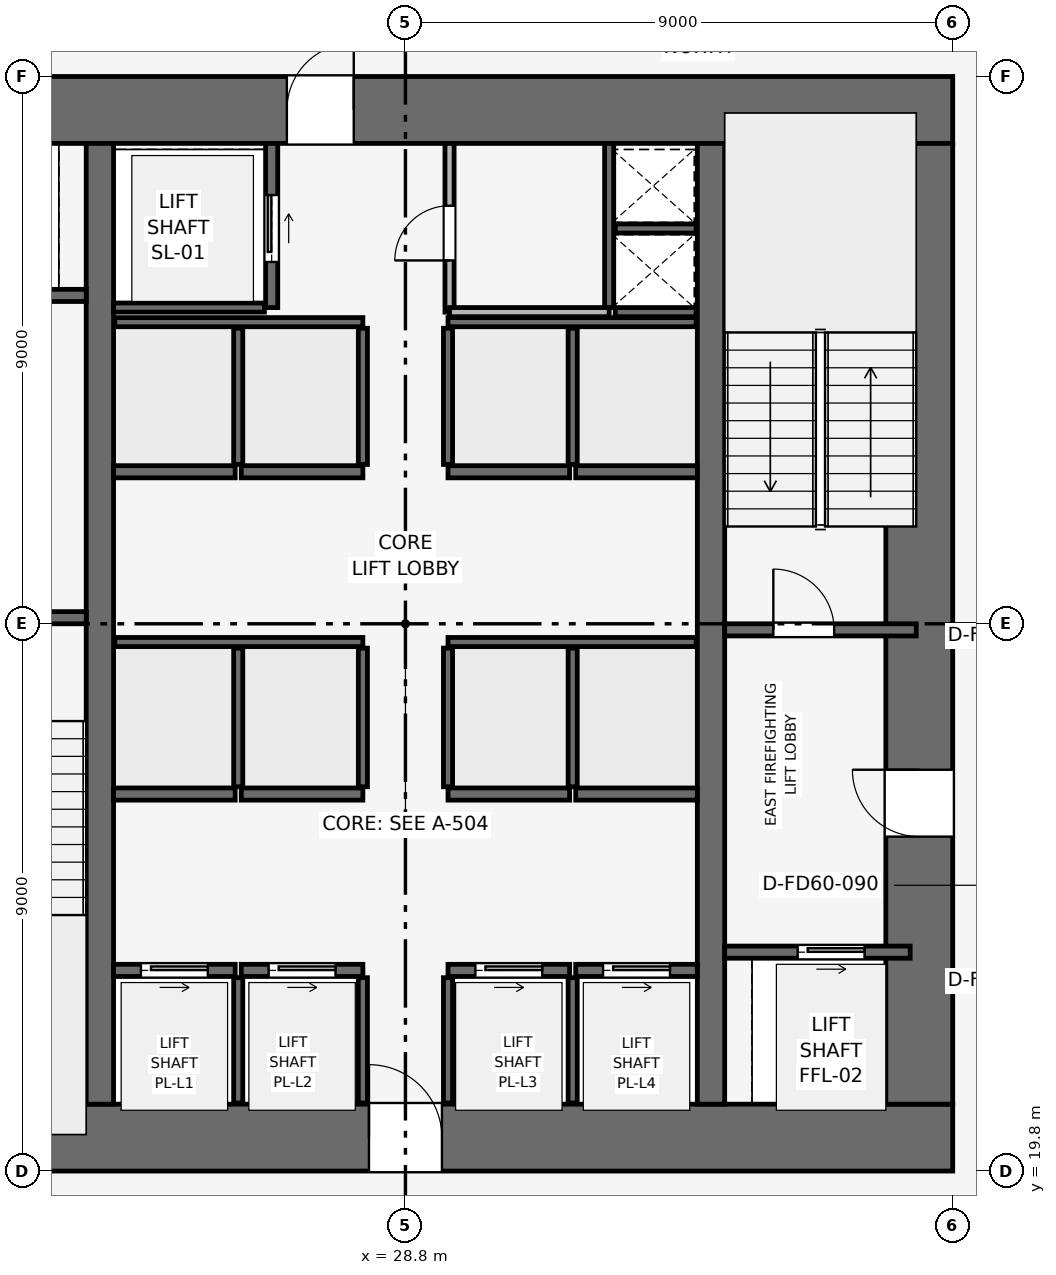
"""IFC4 building model, lengths in metres.
Left out: names, types, materials, properties, quantities, classifications, styles, units other than length and angle.
Written with IfcOpenShell. Run it as: python <this file> out.ifc"""

import sys

from ifc_helpers import new_model, si_unit, direction, frame, frame_2d, origin, place, context, subcontext, project, spatial, rectangle, extrude, element, fill, save


model = new_model("IFC4")
c1 = context("Model", 3, precision=1e-05, world=origin(), true_north=direction((0.0, 1.0)))
c2 = subcontext(c1, "Body", "Model", "MODEL_VIEW")
j1 = project(units=[si_unit("LENGTHUNIT", "METRE"), si_unit("PLANEANGLEUNIT", "RADIAN")], contexts=[c1])
p1 = place(None, origin())
s1 = spatial("IfcSite", under=j1, at=p1, CompositionType="ELEMENT")
p2 = place(p1, origin())
s2 = spatial("IfcBuilding", under=s1, at=p2, CompositionType="ELEMENT")
p3 = place(p2, frame((0.0, 0.0, 61.2)))
s3 = spatial("IfcBuildingStorey", under=s2, at=p3, CompositionType="ELEMENT", Elevation=61.2)
p4 = place(p3, frame((19.8, 20.35, 0.0), z_axis=(0.0, 0.0, 1.0), x_axis=(1.0, 0.0, 0.0)))
e1 = element("IfcWall", 1, at=p4, inside=s3, PredefinedType="SHEAR", context=c2, shape_type="SweptSolid", body=[
    extrude(rectangle(XDim=18.0, YDim=1.1, at=frame_2d((9.0, 0.0))), origin(), (0.0, 0.0, 1.0), 3.9),
])
p5 = place(p4, frame((8.4, 0.0, 0.0)))
e2 = element("IfcOpeningElement", 2, at=p5, cuts=e1, PredefinedType="OPENING", context=c2, shape_type="SweptSolid", body=[
    extrude(rectangle(XDim=1.2, YDim=2.2, at=frame_2d((0.6, 1.1))), frame((0.0, 0.56, 0.0), z_axis=(0.0, -1.0, 0.0), x_axis=(1.0, 0.0, 0.0)), (0.0, 0.0, 1.0), 1.12),
])
p6 = place(p3, frame((19.8, 37.25, 0.0), z_axis=(0.0, 0.0, 1.0), x_axis=(1.0, 0.0, 0.0)))
e3 = element("IfcWall", 3, at=p6, inside=s3, PredefinedType="SHEAR", context=c2, shape_type="SweptSolid", body=[
    extrude(rectangle(XDim=18.0, YDim=1.1, at=frame_2d((9.0, 0.0))), origin(), (0.0, 0.0, 1.0), 3.9),
])
p7 = place(p6, frame((7.05, 0.0, 0.0)))
e4 = element("IfcOpeningElement", 4, at=p7, cuts=e3, PredefinedType="OPENING", context=c2, shape_type="SweptSolid", body=[
    extrude(rectangle(XDim=1.1, YDim=2.15, at=frame_2d((0.55, 1.075))), frame((0.0, 0.56, 0.0), z_axis=(0.0, -1.0, 0.0), x_axis=(1.0, 0.0, 0.0)), (0.0, 0.0, 1.0), 1.12),
])
p8 = place(p3, frame((37.25, 20.9, 0.0), z_axis=(0.0, 0.0, 1.0), x_axis=(0.0, 1.0, 0.0)))
e5 = element("IfcWall", 5, at=p8, inside=s3, PredefinedType="SHEAR", context=c2, shape_type="SweptSolid", body=[
    extrude(rectangle(XDim=15.8, YDim=1.1, at=frame_2d((7.9, 0.0))), origin(), (0.0, 0.0, 1.0), 3.9),
])
p9 = place(p8, frame((4.4, 0.0, 0.0)))
e6 = element("IfcOpeningElement", 6, at=p9, cuts=e5, PredefinedType="OPENING", context=c2, shape_type="SweptSolid", body=[
    extrude(rectangle(XDim=1.1, YDim=2.15, at=frame_2d((0.55, 1.075))), frame((0.0, 0.56, 0.0), z_axis=(0.0, -1.0, 0.0), x_axis=(1.0, 0.0, 0.0)), (0.0, 0.0, 1.0), 1.12),
])
for number, where, z_axis, x_axis in (
    (7, (23.775, 20.9, 0.0), (0.0, 0.0, 1.0), (0.0, 1.0, 0.0)),
    (8, (33.825, 20.9, 0.0), (0.0, 0.0, 1.0), (0.0, 1.0, 0.0)),
):
    element("IfcWall", number, at=place(p3, frame(where, z_axis=z_axis, x_axis=x_axis)), inside=s3, PredefinedType="SHEAR", context=c2, shape_type="SweptSolid", body=[
        extrude(rectangle(XDim=15.8, YDim=0.45, at=frame_2d((7.9, 0.0))), origin(), (0.0, 0.0, 1.0), 3.9),
    ])
p10 = place(p3, frame((20.4, 28.9, 0.0), z_axis=(0.0, 0.0, 1.0), x_axis=(1.0, 0.0, 0.0)))
e9 = element("IfcWall", 9, at=p10, inside=s3, PredefinedType="SHEAR", context=c2, shape_type="SweptSolid", body=[
    extrude(rectangle(XDim=3.15, YDim=0.2, at=frame_2d((1.575, 0.0))), origin(), (0.0, 0.0, 1.0), 3.65),
])
p11 = place(p10, frame((0.8, 0.0, 0.0)))
e10 = element("IfcOpeningElement", 10, at=p11, cuts=e9, PredefinedType="OPENING", context=c2, shape_type="SweptSolid", body=[
    extrude(rectangle(XDim=1.0, YDim=2.1, at=frame_2d((0.5, 1.05))), frame((0.0, 0.11, 0.0), z_axis=(0.0, -1.0, 0.0), x_axis=(1.0, 0.0, 0.0)), (0.0, 0.0, 1.0), 0.22),
])
p12 = place(p3, frame((34.05, 28.7, 0.0), z_axis=(0.0, 0.0, 1.0), x_axis=(1.0, 0.0, 0.0)))
e11 = element("IfcWall", 11, at=p12, inside=s3, PredefinedType="SHEAR", context=c2, shape_type="SweptSolid", body=[
    extrude(rectangle(XDim=3.15, YDim=0.2, at=frame_2d((1.575, 0.0))), origin(), (0.0, 0.0, 1.0), 3.65),
])
p13 = place(p12, frame((0.8, 0.0, 0.0)))
e12 = element("IfcOpeningElement", 12, at=p13, cuts=e11, PredefinedType="OPENING", context=c2, shape_type="SweptSolid", body=[
    extrude(rectangle(XDim=1.0, YDim=2.1, at=frame_2d((0.5, 1.05))), frame((0.0, 0.11, 0.0), z_axis=(0.0, -1.0, 0.0), x_axis=(1.0, 0.0, 0.0)), (0.0, 0.0, 1.0), 0.22),
])
p14 = place(p3, frame((32.15, 34.0, 0.0), z_axis=(0.0, 0.0, 1.0), x_axis=(0.0, 1.0, 0.0)))
e13 = element("IfcWall", 13, at=p14, inside=s3, PredefinedType="SHEAR", context=c2, shape_type="SweptSolid", body=[
    extrude(rectangle(XDim=2.7, YDim=0.15, at=frame_2d((1.35, 0.0))), origin(), (0.0, 0.0, 1.0), 3.65),
])
for number, where, z_axis, x_axis in (
    (14, (32.25, 33.925, 0.0), (0.0, 0.0, 1.0), (1.0, 0.0, 0.0)),
    (15, (32.25, 35.3, 0.0), (0.0, 0.0, 1.0), (1.0, 0.0, 0.0)),
):
    element("IfcWall", number, at=place(p3, frame(where, z_axis=z_axis, x_axis=x_axis)), inside=s3, PredefinedType="SHEAR", context=c2, shape_type="SweptSolid", body=[
        extrude(rectangle(XDim=1.33, YDim=0.15, at=frame_2d((0.665, 0.0))), origin(), (0.0, 0.0, 1.0), 3.65),
    ])
p15 = place(p3, frame((20.5, 34.2, 0.0), z_axis=(0.0, 0.0, 1.0), x_axis=(1.0, 0.0, 0.0)))
e16 = element("IfcWall", 16, at=p15, inside=s3, PredefinedType="SHEAR", context=c2, shape_type="SweptSolid", body=[
    extrude(rectangle(XDim=3.05, YDim=0.2, at=frame_2d((1.525, 0.0))), origin(), (0.0, 0.0, 1.0), 3.65),
])
p16 = place(p15, frame((0.75, 0.0, 0.0)))
e17 = element("IfcOpeningElement", 17, at=p16, cuts=e16, PredefinedType="OPENING", context=c2, shape_type="SweptSolid", body=[
    extrude(rectangle(XDim=1.1, YDim=2.15, at=frame_2d((0.55, 1.075))), frame((0.0, 0.11, 0.0), z_axis=(0.0, -1.0, 0.0), x_axis=(1.0, 0.0, 0.0)), (0.0, 0.0, 1.0), 0.22),
])
p17 = place(p3, frame((34.05, 23.4, 0.0), z_axis=(0.0, 0.0, 1.0), x_axis=(1.0, 0.0, 0.0)))
e18 = element("IfcWall", 18, at=p17, inside=s3, PredefinedType="SHEAR", context=c2, shape_type="SweptSolid", body=[
    extrude(rectangle(XDim=3.05, YDim=0.2, at=frame_2d((1.525, 0.0))), origin(), (0.0, 0.0, 1.0), 3.65),
])
p18 = place(p17, frame((1.2, 0.0, 0.0)))
e19 = element("IfcOpeningElement", 19, at=p18, cuts=e18, PredefinedType="OPENING", context=c2, shape_type="SweptSolid", body=[
    extrude(rectangle(XDim=1.1, YDim=2.15, at=frame_2d((0.55, 1.075))), frame((0.0, 0.11, 0.0), z_axis=(0.0, -1.0, 0.0), x_axis=(1.0, 0.0, 0.0)), (0.0, 0.0, 1.0), 0.22),
])
p19 = place(p3, frame((26.6, 34.0, 0.0), z_axis=(0.0, 0.0, 1.0), x_axis=(0.0, 1.0, 0.0)))
e20 = element("IfcWall", 20, at=p19, inside=s3, PredefinedType="SHEAR", context=c2, shape_type="SweptSolid", body=[
    extrude(rectangle(XDim=2.7, YDim=0.2, at=frame_2d((1.35, 0.0))), origin(), (0.0, 0.0, 1.0), 3.65),
])
p20 = place(p19, frame((0.75, 0.0, 0.0)))
e21 = element("IfcOpeningElement", 21, at=p20, cuts=e20, PredefinedType="OPENING", context=c2, shape_type="SweptSolid", body=[
    extrude(rectangle(XDim=1.1, YDim=2.15, at=frame_2d((0.55, 1.075))), frame((0.0, 0.11, 0.0), z_axis=(0.0, -1.0, 0.0), x_axis=(1.0, 0.0, 0.0)), (0.0, 0.0, 1.0), 0.22),
])
p21 = place(p3, frame((24.0, 34.0, 0.0), z_axis=(0.0, 0.0, 1.0), x_axis=(1.0, 0.0, 0.0)))
e22 = element("IfcWall", 22, at=p21, inside=s3, PredefinedType="SHEAR", context=c2, shape_type="SweptSolid", body=[
    extrude(rectangle(XDim=2.48, YDim=0.15, at=frame_2d((1.24, 0.0))), origin(), (0.0, 0.0, 1.0), 3.65),
])
p22 = place(p3, frame((24.0, 23.1, 0.0), z_axis=(0.0, 0.0, 1.0), x_axis=(1.0, 0.0, 0.0)))
e23 = element("IfcWall", 23, at=p22, inside=s3, PredefinedType="SHEAR", context=c2, shape_type="SweptSolid", body=[
    extrude(rectangle(XDim=2.0, YDim=0.2, at=frame_2d((1.0, 0.0))), origin(), (0.0, 0.0, 1.0), 3.65),
])
p23 = place(p22, frame((0.45, 0.0, 0.0)))
e24 = element("IfcOpeningElement", 24, at=p23, cuts=e23, PredefinedType="OPENING", context=c2, shape_type="SweptSolid", body=[
    extrude(rectangle(XDim=1.1, YDim=2.15, at=frame_2d((0.55, 1.075))), frame((0.0, 0.11, 0.0), z_axis=(0.0, -1.0, 0.0), x_axis=(1.0, 0.0, 0.0)), (0.0, 0.0, 1.0), 0.22),
])
p24 = place(p3, frame((26.1, 23.1, 0.0), z_axis=(0.0, 0.0, 1.0), x_axis=(1.0, 0.0, 0.0)))
e25 = element("IfcWall", 25, at=p24, inside=s3, PredefinedType="SHEAR", context=c2, shape_type="SweptSolid", body=[
    extrude(rectangle(XDim=2.0, YDim=0.2, at=frame_2d((1.0, 0.0))), origin(), (0.0, 0.0, 1.0), 3.65),
])
p25 = place(p24, frame((0.45, 0.0, 0.0)))
e26 = element("IfcOpeningElement", 26, at=p25, cuts=e25, PredefinedType="OPENING", context=c2, shape_type="SweptSolid", body=[
    extrude(rectangle(XDim=1.1, YDim=2.15, at=frame_2d((0.55, 1.075))), frame((0.0, 0.11, 0.0), z_axis=(0.0, -1.0, 0.0), x_axis=(1.0, 0.0, 0.0)), (0.0, 0.0, 1.0), 0.22),
])
p26 = place(p3, frame((29.5, 23.1, 0.0), z_axis=(0.0, 0.0, 1.0), x_axis=(1.0, 0.0, 0.0)))
e27 = element("IfcWall", 27, at=p26, inside=s3, PredefinedType="SHEAR", context=c2, shape_type="SweptSolid", body=[
    extrude(rectangle(XDim=2.0, YDim=0.2, at=frame_2d((1.0, 0.0))), origin(), (0.0, 0.0, 1.0), 3.65),
])
p27 = place(p26, frame((0.45, 0.0, 0.0)))
e28 = element("IfcOpeningElement", 28, at=p27, cuts=e27, PredefinedType="OPENING", context=c2, shape_type="SweptSolid", body=[
    extrude(rectangle(XDim=1.1, YDim=2.15, at=frame_2d((0.55, 1.075))), frame((0.0, 0.11, 0.0), z_axis=(0.0, -1.0, 0.0), x_axis=(1.0, 0.0, 0.0)), (0.0, 0.0, 1.0), 0.22),
])
p28 = place(p3, frame((31.6, 23.1, 0.0), z_axis=(0.0, 0.0, 1.0), x_axis=(1.0, 0.0, 0.0)))
e29 = element("IfcWall", 29, at=p28, inside=s3, PredefinedType="SHEAR", context=c2, shape_type="SweptSolid", body=[
    extrude(rectangle(XDim=2.0, YDim=0.2, at=frame_2d((1.0, 0.0))), origin(), (0.0, 0.0, 1.0), 3.65),
])
p29 = place(p28, frame((0.45, 0.0, 0.0)))
e30 = element("IfcOpeningElement", 30, at=p29, cuts=e29, PredefinedType="OPENING", context=c2, shape_type="SweptSolid", body=[
    extrude(rectangle(XDim=1.1, YDim=2.15, at=frame_2d((0.55, 1.075))), frame((0.0, 0.11, 0.0), z_axis=(0.0, -1.0, 0.0), x_axis=(1.0, 0.0, 0.0)), (0.0, 0.0, 1.0), 0.22),
])
for number, where, z_axis, x_axis in (
    (31, (24.0, 26.0, 0.0), (0.0, 0.0, 1.0), (1.0, 0.0, 0.0)),
    (32, (26.1, 26.0, 0.0), (0.0, 0.0, 1.0), (1.0, 0.0, 0.0)),
    (33, (29.5, 26.0, 0.0), (0.0, 0.0, 1.0), (1.0, 0.0, 0.0)),
    (34, (31.6, 26.0, 0.0), (0.0, 0.0, 1.0), (1.0, 0.0, 0.0)),
    (35, (24.0, 31.3, 0.0), (0.0, 0.0, 1.0), (1.0, 0.0, 0.0)),
    (36, (26.1, 31.3, 0.0), (0.0, 0.0, 1.0), (1.0, 0.0, 0.0)),
    (37, (29.5, 31.3, 0.0), (0.0, 0.0, 1.0), (1.0, 0.0, 0.0)),
    (38, (31.6, 31.3, 0.0), (0.0, 0.0, 1.0), (1.0, 0.0, 0.0)),
):
    element("IfcWall", number, at=place(p3, frame(where, z_axis=z_axis, x_axis=x_axis)), inside=s3, PredefinedType="SHEAR", context=c2, shape_type="SweptSolid", body=[
        extrude(rectangle(XDim=2.0, YDim=0.2, at=frame_2d((1.0, 0.0))), origin(), (0.0, 0.0, 1.0), 3.65),
    ])
for number, where, z_axis, x_axis in (
    (39, (26.05, 20.92, 0.0), (0.0, 0.0, 1.0), (0.0, 1.0, 0.0)),
    (40, (28.1, 20.92, 0.0), (0.0, 0.0, 1.0), (0.0, 1.0, 0.0)),
    (41, (29.5, 20.92, 0.0), (0.0, 0.0, 1.0), (0.0, 1.0, 0.0)),
    (42, (31.55, 20.92, 0.0), (0.0, 0.0, 1.0), (0.0, 1.0, 0.0)),
):
    element("IfcWall", number, at=place(p3, frame(where, z_axis=z_axis, x_axis=x_axis)), inside=s3, PredefinedType="SHEAR", context=c2, shape_type="SweptSolid", body=[
        extrude(rectangle(XDim=2.06, YDim=0.15, at=frame_2d((1.03, 0.0))), origin(), (0.0, 0.0, 1.0), 3.65),
    ])
for number, where, z_axis, x_axis in (
    (43, (24.02, 28.5, 0.0), (0.0, 0.0, 1.0), (1.0, 0.0, 0.0)),
    (44, (29.5, 28.5, 0.0), (0.0, 0.0, 1.0), (1.0, 0.0, 0.0)),
):
    element("IfcWall", number, at=place(p3, frame(where, z_axis=z_axis, x_axis=x_axis)), inside=s3, PredefinedType="SHEAR", context=c2, shape_type="SweptSolid", body=[
        extrude(rectangle(XDim=4.08, YDim=0.15, at=frame_2d((2.04, 0.0))), origin(), (0.0, 0.0, 1.0), 3.65),
    ])
for number, where, z_axis, x_axis in (
    (45, (26.05, 26.12, 0.0), (0.0, 0.0, 1.0), (0.0, 1.0, 0.0)),
    (46, (28.1, 26.12, 0.0), (0.0, 0.0, 1.0), (0.0, 1.0, 0.0)),
    (47, (29.5, 26.12, 0.0), (0.0, 0.0, 1.0), (0.0, 1.0, 0.0)),
    (48, (31.55, 26.12, 0.0), (0.0, 0.0, 1.0), (0.0, 1.0, 0.0)),
):
    element("IfcWall", number, at=place(p3, frame(where, z_axis=z_axis, x_axis=x_axis)), inside=s3, PredefinedType="SHEAR", context=c2, shape_type="SweptSolid", body=[
        extrude(rectangle(XDim=2.28, YDim=0.15, at=frame_2d((1.14, 0.0))), origin(), (0.0, 0.0, 1.0), 3.65),
    ])
for number, where, z_axis, x_axis in (
    (49, (24.02, 33.76, 0.0), (0.0, 0.0, 1.0), (1.0, 0.0, 0.0)),
    (50, (29.5, 33.76, 0.0), (0.0, 0.0, 1.0), (1.0, 0.0, 0.0)),
):
    element("IfcWall", number, at=place(p3, frame(where, z_axis=z_axis, x_axis=x_axis)), inside=s3, PredefinedType="SHEAR", context=c2, shape_type="SweptSolid", body=[
        extrude(rectangle(XDim=4.08, YDim=0.15, at=frame_2d((2.04, 0.0))), origin(), (0.0, 0.0, 1.0), 3.65),
    ])
for number, where, z_axis, x_axis in (
    (51, (26.05, 31.42, 0.0), (0.0, 0.0, 1.0), (0.0, 1.0, 0.0)),
    (52, (28.1, 31.42, 0.0), (0.0, 0.0, 1.0), (0.0, 1.0, 0.0)),
    (53, (29.5, 31.42, 0.0), (0.0, 0.0, 1.0), (0.0, 1.0, 0.0)),
    (54, (31.55, 31.42, 0.0), (0.0, 0.0, 1.0), (0.0, 1.0, 0.0)),
):
    element("IfcWall", number, at=place(p3, frame(where, z_axis=z_axis, x_axis=x_axis)), inside=s3, PredefinedType="SHEAR", context=c2, shape_type="SweptSolid", body=[
        extrude(rectangle(XDim=2.24, YDim=0.15, at=frame_2d((1.12, 0.0))), origin(), (0.0, 0.0, 1.0), 3.65),
    ])
p30 = place(p3, frame((29.525, 33.925, 0.0), z_axis=(0.0, 0.0, 1.0), x_axis=(0.0, 1.0, 0.0)))
e55 = element("IfcWall", 55, at=p30, inside=s3, PredefinedType="PARTITIONING", context=c2, shape_type="SweptSolid", body=[
    extrude(rectangle(XDim=2.775, YDim=0.15, at=frame_2d((1.387, 0.0))), origin(), (0.0, 0.0, 1.0), 3.65),
])
p31 = place(p30, frame((0.85, 0.0, 0.0)))
e56 = element("IfcOpeningElement", 56, at=p31, cuts=e55, PredefinedType="OPENING", context=c2, shape_type="SweptSolid", body=[
    extrude(rectangle(XDim=0.9, YDim=2.1, at=frame_2d((0.45, 1.05))), frame((0.0, 0.085, 0.0), z_axis=(0.0, -1.0, 0.0), x_axis=(1.0, 0.0, 0.0)), (0.0, 0.0, 1.0), 0.17),
])
p32 = place(p3, frame((29.525, 33.925, 0.0), z_axis=(0.0, 0.0, 1.0), x_axis=(1.0, 0.0, 0.0)))
e57 = element("IfcWall", 57, at=p32, inside=s3, PredefinedType="PARTITIONING", context=c2, shape_type="SweptSolid", body=[
    extrude(rectangle(XDim=2.625, YDim=0.15, at=frame_2d((1.312, 0.0))), origin(), (0.0, 0.0, 1.0), 3.65),
])
p33 = place(p13, origin())
e58 = element("IfcDoor", 58, at=p33, inside=s3, OperationType="SINGLE_SWING_LEFT", PredefinedType="DOOR", context=c2, shape_type="SweptSolid", body=[
    extrude(rectangle(XDim=1.0, YDim=2.1, at=frame_2d((0.5, 1.05))), frame((0.0, 0.025, 0.0), z_axis=(0.0, -1.0, 0.0), x_axis=(1.0, 0.0, 0.0)), (0.0, 0.0, 1.0), 0.05),
])
fill(e12, e58)
p34 = place(p18, origin())
e59 = element("IfcDoor", 59, at=p34, inside=s3, OperationType="SLIDING_TO_RIGHT", PredefinedType="DOOR", context=c2, shape_type="SweptSolid", body=[
    extrude(rectangle(XDim=1.1, YDim=2.15, at=frame_2d((0.55, 1.075))), frame((0.0, 0.025, 0.0), z_axis=(0.0, -1.0, 0.0), x_axis=(1.0, 0.0, 0.0)), (0.0, 0.0, 1.0), 0.05),
])
fill(e19, e59)
p35 = place(p20, origin())
e60 = element("IfcDoor", 60, at=p35, inside=s3, OperationType="SLIDING_TO_RIGHT", PredefinedType="DOOR", context=c2, shape_type="SweptSolid", body=[
    extrude(rectangle(XDim=1.1, YDim=2.15, at=frame_2d((0.55, 1.075))), frame((0.0, 0.025, 0.0), z_axis=(0.0, -1.0, 0.0), x_axis=(1.0, 0.0, 0.0)), (0.0, 0.0, 1.0), 0.05),
])
fill(e21, e60)
p36 = place(p23, origin())
e61 = element("IfcDoor", 61, at=p36, inside=s3, OperationType="SLIDING_TO_RIGHT", PredefinedType="DOOR", context=c2, shape_type="SweptSolid", body=[
    extrude(rectangle(XDim=1.1, YDim=2.15, at=frame_2d((0.55, 1.075))), frame((0.0, 0.025, 0.0), z_axis=(0.0, -1.0, 0.0), x_axis=(1.0, 0.0, 0.0)), (0.0, 0.0, 1.0), 0.05),
])
fill(e24, e61)
p37 = place(p25, origin())
e62 = element("IfcDoor", 62, at=p37, inside=s3, OperationType="SLIDING_TO_RIGHT", PredefinedType="DOOR", context=c2, shape_type="SweptSolid", body=[
    extrude(rectangle(XDim=1.1, YDim=2.15, at=frame_2d((0.55, 1.075))), frame((0.0, 0.025, 0.0), z_axis=(0.0, -1.0, 0.0), x_axis=(1.0, 0.0, 0.0)), (0.0, 0.0, 1.0), 0.05),
])
fill(e26, e62)
p38 = place(p27, origin())
e63 = element("IfcDoor", 63, at=p38, inside=s3, OperationType="SLIDING_TO_RIGHT", PredefinedType="DOOR", context=c2, shape_type="SweptSolid", body=[
    extrude(rectangle(XDim=1.1, YDim=2.15, at=frame_2d((0.55, 1.075))), frame((0.0, 0.025, 0.0), z_axis=(0.0, -1.0, 0.0), x_axis=(1.0, 0.0, 0.0)), (0.0, 0.0, 1.0), 0.05),
])
fill(e28, e63)
p39 = place(p29, origin())
e64 = element("IfcDoor", 64, at=p39, inside=s3, OperationType="SLIDING_TO_RIGHT", PredefinedType="DOOR", context=c2, shape_type="SweptSolid", body=[
    extrude(rectangle(XDim=1.1, YDim=2.15, at=frame_2d((0.55, 1.075))), frame((0.0, 0.025, 0.0), z_axis=(0.0, -1.0, 0.0), x_axis=(1.0, 0.0, 0.0)), (0.0, 0.0, 1.0), 0.05),
])
fill(e30, e64)
p40 = place(p31, origin())
e65 = element("IfcDoor", 65, at=p40, inside=s3, OperationType="SINGLE_SWING_LEFT", PredefinedType="DOOR", context=c2, shape_type="SweptSolid", body=[
    extrude(rectangle(XDim=0.9, YDim=2.1, at=frame_2d((0.45, 1.05))), frame((0.0, 0.025, 0.0), z_axis=(0.0, -1.0, 0.0), x_axis=(1.0, 0.0, 0.0)), (0.0, 0.0, 1.0), 0.05),
])
fill(e56, e65)
p41 = place(p9, origin())
e66 = element("IfcDoor", 66, at=p41, inside=s3, OperationType="SINGLE_SWING_RIGHT", PredefinedType="DOOR", context=c2, shape_type="SweptSolid", body=[
    extrude(rectangle(XDim=1.1, YDim=2.15, at=frame_2d((0.55, 1.075))), frame((0.0, 0.025, 0.0), z_axis=(0.0, -1.0, 0.0), x_axis=(1.0, 0.0, 0.0)), (0.0, 0.0, 1.0), 0.05),
])
fill(e6, e66)
p42 = place(p5, origin())
e67 = element("IfcDoor", 67, at=p42, inside=s3, OperationType="SINGLE_SWING_LEFT", PredefinedType="DOOR", context=c2, shape_type="SweptSolid", body=[
    extrude(rectangle(XDim=1.2, YDim=2.2, at=frame_2d((0.6, 1.1))), frame((0.0, 0.025, 0.0), z_axis=(0.0, -1.0, 0.0), x_axis=(1.0, 0.0, 0.0)), (0.0, 0.0, 1.0), 0.05),
])
fill(e2, e67)
p43 = place(p7, origin())
e68 = element("IfcDoor", 68, at=p43, inside=s3, OperationType="SINGLE_SWING_RIGHT", PredefinedType="DOOR", context=c2, shape_type="SweptSolid", body=[
    extrude(rectangle(XDim=1.1, YDim=2.15, at=frame_2d((0.55, 1.075))), frame((0.0, 0.025, 0.0), z_axis=(0.0, -1.0, 0.0), x_axis=(1.0, 0.0, 0.0)), (0.0, 0.0, 1.0), 0.05),
])
fill(e4, e68)
save(model, sys.argv[1])
